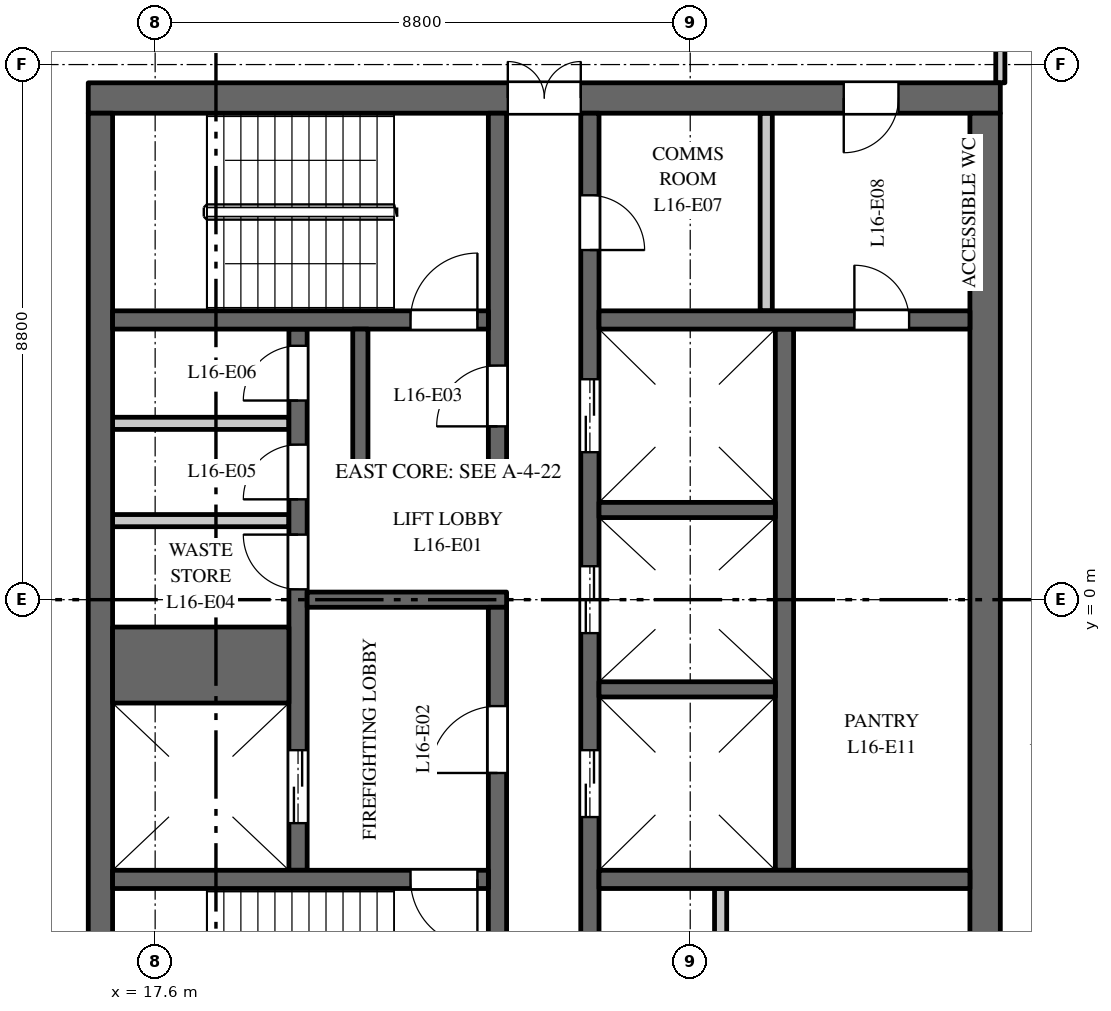
"""IFC4 building model, lengths in metres.
Left out: names, types, materials, properties, quantities, classifications, styles, units other than length and angle.
Written with IfcOpenShell. Run it as: python <this file> out.ifc"""

import sys

from ifc_helpers import new_model, si_unit, direction, frame, frame_2d, origin, place, context, subcontext, project, spatial, rectangle, extrude, element, fill, save


model = new_model("IFC4")
c1 = context("Model", 3, precision=1e-05, world=origin(), true_north=direction((0.0, 1.0)))
c2 = subcontext(c1, "Body", "Model", "MODEL_VIEW")
j1 = project(units=[si_unit("LENGTHUNIT", "METRE"), si_unit("PLANEANGLEUNIT", "RADIAN")], contexts=[c1])
p1 = place(None, origin())
s1 = spatial("IfcSite", under=j1, at=p1, CompositionType="ELEMENT")
p2 = place(p1, origin())
s2 = spatial("IfcBuilding", under=s1, at=p2, CompositionType="ELEMENT")
p3 = place(p2, frame((0.0, 0.0, 74.5)))
s3 = spatial("IfcBuildingStorey", under=s2, at=p3, CompositionType="ELEMENT", Elevation=74.5)
p4 = place(p3, frame((16.5, 8.25, 0.0), z_axis=(0.0, 0.0, 1.0), x_axis=(1.0, 0.0, 0.0)))
e1 = element("IfcWall", 1, at=p4, inside=s3, PredefinedType="SHEAR", context=c2, shape_type="SweptSolid", body=[
    extrude(rectangle(XDim=15.0, YDim=0.5, at=frame_2d((7.5, 0.0))), origin(), (0.0, 0.0, 1.0), 3.7),
])
p5 = place(p4, frame((6.9, 0.0, 0.0)))
e2 = element("IfcOpeningElement", 2, at=p5, cuts=e1, PredefinedType="OPENING", context=c2, shape_type="SweptSolid", body=[
    extrude(rectangle(XDim=1.2, YDim=2.1, at=frame_2d((0.6, 1.05))), frame((0.0, 0.26, 0.0), z_axis=(0.0, -1.0, 0.0), x_axis=(1.0, 0.0, 0.0)), (0.0, 0.0, 1.0), 0.52),
])
p6 = place(p4, frame((12.425, 0.0, 0.0)))
e3 = element("IfcOpeningElement", 3, at=p6, cuts=e1, PredefinedType="OPENING", context=c2, shape_type="SweptSolid", body=[
    extrude(rectangle(XDim=0.9, YDim=2.1, at=frame_2d((0.45, 1.05))), frame((0.0, 0.26, 0.0), z_axis=(0.0, -1.0, 0.0), x_axis=(1.0, 0.0, 0.0)), (0.0, 0.0, 1.0), 0.52),
])
for number, where, z_axis, x_axis in (
    (4, (16.9, 1.3, 0.0), (0.0, 0.0, 1.0), (1.0, 0.0, 0.0)),
    (5, (16.9, 2.9, 0.0), (0.0, 0.0, 1.0), (1.0, 0.0, 0.0)),
):
    element("IfcWall", number, at=place(p3, frame(where, z_axis=z_axis, x_axis=x_axis)), inside=s3, PredefinedType="PARTITIONING", context=c2, shape_type="SweptSolid", body=[
        extrude(rectangle(XDim=2.9, YDim=0.2, at=frame_2d((1.45, 0.0))), origin(), (0.0, 0.0, 1.0), 3.7),
    ])
p7 = place(p3, frame((27.95, -4.45, 0.0), z_axis=(0.0, 0.0, 1.0), x_axis=(0.0, 1.0, 0.0)))
e6 = element("IfcWall", 6, at=p7, inside=s3, PredefinedType="SHEAR", context=c2, shape_type="SweptSolid", body=[
    extrude(rectangle(XDim=8.9, YDim=0.3, at=frame_2d((4.45, 0.0))), origin(), (0.0, 0.0, 1.0), 3.7),
])
p8 = place(p3, frame((19.95, -4.45, 0.0), z_axis=(0.0, 0.0, 1.0), x_axis=(0.0, 1.0, 0.0)))
e7 = element("IfcWall", 7, at=p8, inside=s3, PredefinedType="SHEAR", context=c2, shape_type="SweptSolid", body=[
    extrude(rectangle(XDim=8.9, YDim=0.3, at=frame_2d((4.45, 0.0))), origin(), (0.0, 0.0, 1.0), 3.7),
])
p9 = place(p8, frame((0.775, 0.0, 0.0)))
e8 = element("IfcOpeningElement", 8, at=p9, cuts=e7, PredefinedType="OPENING", context=c2, shape_type="SweptSolid", body=[
    extrude(rectangle(XDim=1.2, YDim=2.1, at=frame_2d((0.6, 1.05))), frame((0.0, 0.16, 0.0), z_axis=(0.0, -1.0, 0.0), x_axis=(1.0, 0.0, 0.0)), (0.0, 0.0, 1.0), 0.32),
])
p10 = place(p8, frame((4.62, 0.0, 0.0)))
e9 = element("IfcOpeningElement", 9, at=p10, cuts=e7, PredefinedType="OPENING", context=c2, shape_type="SweptSolid", body=[
    extrude(rectangle(XDim=0.9, YDim=2.1, at=frame_2d((0.45, 1.05))), frame((0.0, 0.16, 0.0), z_axis=(0.0, -1.0, 0.0), x_axis=(1.0, 0.0, 0.0)), (0.0, 0.0, 1.0), 0.32),
])
p11 = place(p8, frame((6.1, 0.0, 0.0)))
e10 = element("IfcOpeningElement", 10, at=p11, cuts=e7, PredefinedType="OPENING", context=c2, shape_type="SweptSolid", body=[
    extrude(rectangle(XDim=0.9, YDim=2.1, at=frame_2d((0.45, 1.05))), frame((0.0, 0.16, 0.0), z_axis=(0.0, -1.0, 0.0), x_axis=(1.0, 0.0, 0.0)), (0.0, 0.0, 1.0), 0.32),
])
p12 = place(p8, frame((7.725, 0.0, 0.0)))
e11 = element("IfcOpeningElement", 11, at=p12, cuts=e7, PredefinedType="OPENING", context=c2, shape_type="SweptSolid", body=[
    extrude(rectangle(XDim=0.9, YDim=2.1, at=frame_2d((0.45, 1.05))), frame((0.0, 0.16, 0.0), z_axis=(0.0, -1.0, 0.0), x_axis=(1.0, 0.0, 0.0)), (0.0, 0.0, 1.0), 0.32),
])
p13 = place(p3, frame((24.75, -8.0, 0.0), z_axis=(0.0, 0.0, 1.0), x_axis=(0.0, 1.0, 0.0)))
e12 = element("IfcWall", 12, at=p13, inside=s3, PredefinedType="SHEAR", context=c2, shape_type="SweptSolid", body=[
    extrude(rectangle(XDim=16.0, YDim=0.3, at=frame_2d((8.0, 0.0))), origin(), (0.0, 0.0, 1.0), 3.7),
])
p14 = place(p13, frame((4.425, 0.0, 0.0)))
e13 = element("IfcOpeningElement", 13, at=p14, cuts=e12, PredefinedType="OPENING", context=c2, shape_type="SweptSolid", body=[
    extrude(rectangle(XDim=1.1, YDim=2.1, at=frame_2d((0.55, 1.05))), frame((0.0, 0.16, 0.0), z_axis=(0.0, -1.0, 0.0), x_axis=(1.0, 0.0, 0.0)), (0.0, 0.0, 1.0), 0.32),
])
p15 = place(p13, frame((7.45, 0.0, 0.0)))
e14 = element("IfcOpeningElement", 14, at=p15, cuts=e12, PredefinedType="OPENING", context=c2, shape_type="SweptSolid", body=[
    extrude(rectangle(XDim=1.1, YDim=2.1, at=frame_2d((0.55, 1.05))), frame((0.0, 0.16, 0.0), z_axis=(0.0, -1.0, 0.0), x_axis=(1.0, 0.0, 0.0)), (0.0, 0.0, 1.0), 0.32),
])
p16 = place(p13, frame((10.425, 0.0, 0.0)))
e15 = element("IfcOpeningElement", 15, at=p16, cuts=e12, PredefinedType="OPENING", context=c2, shape_type="SweptSolid", body=[
    extrude(rectangle(XDim=1.2, YDim=2.1, at=frame_2d((0.6, 1.05))), frame((0.0, 0.16, 0.0), z_axis=(0.0, -1.0, 0.0), x_axis=(1.0, 0.0, 0.0)), (0.0, 0.0, 1.0), 0.32),
])
p17 = place(p13, frame((13.75, 0.0, 0.0)))
e16 = element("IfcOpeningElement", 16, at=p17, cuts=e12, PredefinedType="OPENING", context=c2, shape_type="SweptSolid", body=[
    extrude(rectangle(XDim=0.9, YDim=2.1, at=frame_2d((0.45, 1.05))), frame((0.0, 0.16, 0.0), z_axis=(0.0, -1.0, 0.0), x_axis=(1.0, 0.0, 0.0)), (0.0, 0.0, 1.0), 0.32),
])
p18 = place(p13, frame((1.35, 0.0, 0.0)))
e17 = element("IfcOpeningElement", 17, at=p18, cuts=e12, PredefinedType="OPENING", context=c2, shape_type="SweptSolid", body=[
    extrude(rectangle(XDim=0.9, YDim=2.1, at=frame_2d((0.45, 1.05))), frame((0.0, 0.16, 0.0), z_axis=(0.0, -1.0, 0.0), x_axis=(1.0, 0.0, 0.0)), (0.0, 0.0, 1.0), 0.32),
])
p19 = place(p3, frame((20.1, 0.0, 0.0), z_axis=(0.0, 0.0, 1.0), x_axis=(1.0, 0.0, 0.0)))
e18 = element("IfcWall", 18, at=p19, inside=s3, PredefinedType="SHEAR", context=c2, shape_type="SweptSolid", body=[
    extrude(rectangle(XDim=3.28, YDim=0.25, at=frame_2d((1.64, 0.0))), origin(), (0.0, 0.0, 1.0), 3.7),
])
p20 = place(p3, frame((16.7, -8.0, 0.0), z_axis=(0.0, 0.0, 1.0), x_axis=(0.0, 1.0, 0.0)))
e19 = element("IfcWall", 19, at=p20, inside=s3, PredefinedType="SHEAR", context=c2, shape_type="SweptSolid", body=[
    extrude(rectangle(XDim=16.0, YDim=0.4, at=frame_2d((8.0, 0.0))), origin(), (0.0, 0.0, 1.0), 3.7),
])
p21 = place(p3, frame((31.25, -8.0, 0.0), z_axis=(0.0, 0.0, 1.0), x_axis=(0.0, 1.0, 0.0)))
e20 = element("IfcWall", 20, at=p21, inside=s3, PredefinedType="SHEAR", context=c2, shape_type="SweptSolid", body=[
    extrude(rectangle(XDim=16.0, YDim=0.5, at=frame_2d((8.0, 0.0))), origin(), (0.0, 0.0, 1.0), 3.7),
])
p22 = place(p3, frame((24.9, 4.6, 0.0), z_axis=(0.0, 0.0, 1.0), x_axis=(1.0, 0.0, 0.0)))
e21 = element("IfcWall", 21, at=p22, inside=s3, PredefinedType="SHEAR", context=c2, shape_type="SweptSolid", body=[
    extrude(rectangle(XDim=6.1, YDim=0.3, at=frame_2d((3.05, 0.0))), origin(), (0.0, 0.0, 1.0), 3.7),
])
p23 = place(p22, frame((4.2, 0.0, 0.0)))
e22 = element("IfcOpeningElement", 22, at=p23, cuts=e21, PredefinedType="OPENING", context=c2, shape_type="SweptSolid", body=[
    extrude(rectangle(XDim=0.9, YDim=2.1, at=frame_2d((0.45, 1.05))), frame((0.0, 0.16, 0.0), z_axis=(0.0, -1.0, 0.0), x_axis=(1.0, 0.0, 0.0)), (0.0, 0.0, 1.0), 0.32),
])
for number, where, z_axis, x_axis in (
    (23, (27.65, 4.75, 0.0), (0.0, 0.0, 1.0), (0.0, 1.0, 0.0)),
    (24, (26.9, -8.0, 0.0), (0.0, 0.0, 1.0), (0.0, 1.0, 0.0)),
):
    element("IfcWall", number, at=place(p3, frame(where, z_axis=z_axis, x_axis=x_axis)), inside=s3, PredefinedType="PARTITIONING", context=c2, shape_type="SweptSolid", body=[
        extrude(rectangle(XDim=3.25, YDim=0.2, at=frame_2d((1.625, 0.0))), origin(), (0.0, 0.0, 1.0), 3.7),
    ])
p24 = place(p3, frame((24.9, -4.6, 0.0), z_axis=(0.0, 0.0, 1.0), x_axis=(1.0, 0.0, 0.0)))
e25 = element("IfcWall", 25, at=p24, inside=s3, PredefinedType="SHEAR", context=c2, shape_type="SweptSolid", body=[
    extrude(rectangle(XDim=6.1, YDim=0.3, at=frame_2d((3.05, 0.0))), origin(), (0.0, 0.0, 1.0), 3.7),
])
p25 = place(p3, frame((16.9, -1.075, 0.0), z_axis=(0.0, 0.0, 1.0), x_axis=(1.0, 0.0, 0.0)))
e26 = element("IfcWall", 26, at=p25, inside=s3, PredefinedType="SHEAR", context=c2, shape_type="SweptSolid", body=[
    extrude(rectangle(XDim=2.9, YDim=1.25, at=frame_2d((1.45, 0.0))), origin(), (0.0, 0.0, 1.0), 3.7),
])
for number, where, z_axis, x_axis in (
    (27, (24.9, -1.475, 0.0), (0.0, 0.0, 1.0), (1.0, 0.0, 0.0)),
    (28, (24.9, 1.475, 0.0), (0.0, 0.0, 1.0), (1.0, 0.0, 0.0)),
):
    element("IfcWall", number, at=place(p3, frame(where, z_axis=z_axis, x_axis=x_axis)), inside=s3, PredefinedType="SHEAR", context=c2, shape_type="SweptSolid", body=[
        extrude(rectangle(XDim=2.9, YDim=0.25, at=frame_2d((1.45, 0.0))), origin(), (0.0, 0.0, 1.0), 3.7),
    ])
p26 = place(p3, frame((23.23, 2.25, 0.0), z_axis=(0.0, 0.0, 1.0), x_axis=(0.0, 1.0, 0.0)))
e29 = element("IfcWall", 29, at=p26, inside=s3, PredefinedType="SHEAR", context=c2, shape_type="SweptSolid", body=[
    extrude(rectangle(XDim=5.75, YDim=0.3, at=frame_2d((2.875, 0.0))), origin(), (0.0, 0.0, 1.0), 3.7),
])
p27 = place(p26, frame((0.6, 0.0, 0.0)))
e30 = element("IfcOpeningElement", 30, at=p27, cuts=e29, PredefinedType="OPENING", context=c2, shape_type="SweptSolid", body=[
    extrude(rectangle(XDim=1.0, YDim=2.1, at=frame_2d((0.5, 1.05))), frame((0.0, 0.16, 0.0), z_axis=(0.0, -1.0, 0.0), x_axis=(1.0, 0.0, 0.0)), (0.0, 0.0, 1.0), 0.32),
])
p28 = place(p3, frame((23.23, -8.0, 0.0), z_axis=(0.0, 0.0, 1.0), x_axis=(0.0, 1.0, 0.0)))
e31 = element("IfcWall", 31, at=p28, inside=s3, PredefinedType="SHEAR", context=c2, shape_type="SweptSolid", body=[
    extrude(rectangle(XDim=7.875, YDim=0.3, at=frame_2d((3.938, 0.0))), origin(), (0.0, 0.0, 1.0), 3.7),
])
p29 = place(p28, frame((5.15, 0.0, 0.0)))
e32 = element("IfcOpeningElement", 32, at=p29, cuts=e31, PredefinedType="OPENING", context=c2, shape_type="SweptSolid", body=[
    extrude(rectangle(XDim=1.1, YDim=2.1, at=frame_2d((0.55, 1.05))), frame((0.0, 0.16, 0.0), z_axis=(0.0, -1.0, 0.0), x_axis=(1.0, 0.0, 0.0)), (0.0, 0.0, 1.0), 0.32),
])
p30 = place(p3, frame((16.9, 4.6, 0.0), z_axis=(0.0, 0.0, 1.0), x_axis=(1.0, 0.0, 0.0)))
e33 = element("IfcWall", 33, at=p30, inside=s3, PredefinedType="SHEAR", context=c2, shape_type="SweptSolid", body=[
    extrude(rectangle(XDim=6.18, YDim=0.3, at=frame_2d((3.09, 0.0))), origin(), (0.0, 0.0, 1.0), 3.7),
])
p31 = place(p30, frame((4.9, 0.0, 0.0)))
e34 = element("IfcOpeningElement", 34, at=p31, cuts=e33, PredefinedType="OPENING", context=c2, shape_type="SweptSolid", body=[
    extrude(rectangle(XDim=1.1, YDim=2.1, at=frame_2d((0.55, 1.05))), frame((0.0, 0.16, 0.0), z_axis=(0.0, -1.0, 0.0), x_axis=(1.0, 0.0, 0.0)), (0.0, 0.0, 1.0), 0.32),
])
p32 = place(p3, frame((16.9, -4.6, 0.0), z_axis=(0.0, 0.0, 1.0), x_axis=(1.0, 0.0, 0.0)))
e35 = element("IfcWall", 35, at=p32, inside=s3, PredefinedType="SHEAR", context=c2, shape_type="SweptSolid", body=[
    extrude(rectangle(XDim=6.18, YDim=0.3, at=frame_2d((3.09, 0.0))), origin(), (0.0, 0.0, 1.0), 3.7),
])
p33 = place(p32, frame((4.9, 0.0, 0.0)))
e36 = element("IfcOpeningElement", 36, at=p33, cuts=e35, PredefinedType="OPENING", context=c2, shape_type="SweptSolid", body=[
    extrude(rectangle(XDim=1.1, YDim=2.1, at=frame_2d((0.55, 1.05))), frame((0.0, 0.16, 0.0), z_axis=(0.0, -1.0, 0.0), x_axis=(1.0, 0.0, 0.0)), (0.0, 0.0, 1.0), 0.32),
])
p34 = place(p3, frame((20.85, 2.125, 0.0), z_axis=(0.0, 0.0, 1.0), x_axis=(1.0, 0.0, 0.0)))
e37 = element("IfcWall", 37, at=p34, inside=s3, PredefinedType="SHEAR", context=c2, shape_type="SweptSolid", body=[
    extrude(rectangle(XDim=2.53, YDim=0.25, at=frame_2d((1.265, 0.0))), origin(), (0.0, 0.0, 1.0), 3.7),
])
p35 = place(p3, frame((20.975, 2.25, 0.0), z_axis=(0.0, 0.0, 1.0), x_axis=(0.0, 1.0, 0.0)))
e38 = element("IfcWall", 38, at=p35, inside=s3, PredefinedType="SHEAR", context=c2, shape_type="SweptSolid", body=[
    extrude(rectangle(XDim=2.2, YDim=0.25, at=frame_2d((1.1, 0.0))), origin(), (0.0, 0.0, 1.0), 3.7),
])
p36 = place(p3, frame((31.5, 8.5, 0.0), z_axis=(0.0, 0.0, 1.0), x_axis=(0.0, 1.0, 0.0)))
e39 = element("IfcWall", 39, at=p36, inside=s3, PredefinedType="PARTITIONING", context=c2, shape_type="SweptSolid", body=[
    extrude(rectangle(XDim=2.2, YDim=0.15, at=frame_2d((1.1, 0.0))), origin(), (0.0, 0.0, 1.0), 2.85),
])
p37 = place(p9, origin())
e40 = element("IfcDoor", 40, at=p37, inside=s3, OperationType="DOUBLE_DOOR_SLIDING", PredefinedType="DOOR", context=c2, shape_type="SweptSolid", body=[
    extrude(rectangle(XDim=1.2, YDim=2.1, at=frame_2d((0.6, 1.05))), frame((0.0, 0.025, 0.0), z_axis=(0.0, -1.0, 0.0), x_axis=(1.0, 0.0, 0.0)), (0.0, 0.0, 1.0), 0.05),
])
fill(e8, e40)
p38 = place(p14, origin())
e41 = element("IfcDoor", 41, at=p38, inside=s3, OperationType="DOUBLE_DOOR_SLIDING", PredefinedType="DOOR", context=c2, shape_type="SweptSolid", body=[
    extrude(rectangle(XDim=1.1, YDim=2.1, at=frame_2d((0.55, 1.05))), frame((0.0, 0.025, 0.0), z_axis=(0.0, -1.0, 0.0), x_axis=(1.0, 0.0, 0.0)), (0.0, 0.0, 1.0), 0.05),
])
fill(e13, e41)
p39 = place(p15, origin())
e42 = element("IfcDoor", 42, at=p39, inside=s3, OperationType="DOUBLE_DOOR_SLIDING", PredefinedType="DOOR", context=c2, shape_type="SweptSolid", body=[
    extrude(rectangle(XDim=1.1, YDim=2.1, at=frame_2d((0.55, 1.05))), frame((0.0, 0.025, 0.0), z_axis=(0.0, -1.0, 0.0), x_axis=(1.0, 0.0, 0.0)), (0.0, 0.0, 1.0), 0.05),
])
fill(e14, e42)
p40 = place(p16, origin())
e43 = element("IfcDoor", 43, at=p40, inside=s3, OperationType="DOUBLE_DOOR_SLIDING", PredefinedType="DOOR", context=c2, shape_type="SweptSolid", body=[
    extrude(rectangle(XDim=1.2, YDim=2.1, at=frame_2d((0.6, 1.05))), frame((0.0, 0.025, 0.0), z_axis=(0.0, -1.0, 0.0), x_axis=(1.0, 0.0, 0.0)), (0.0, 0.0, 1.0), 0.05),
])
fill(e15, e43)
p41 = place(p31, origin())
e44 = element("IfcDoor", 44, at=p41, inside=s3, OperationType="SINGLE_SWING_LEFT", PredefinedType="DOOR", context=c2, shape_type="SweptSolid", body=[
    extrude(rectangle(XDim=1.1, YDim=2.1, at=frame_2d((0.55, 1.05))), frame((0.0, 0.025, 0.0), z_axis=(0.0, -1.0, 0.0), x_axis=(1.0, 0.0, 0.0)), (0.0, 0.0, 1.0), 0.05),
])
fill(e34, e44)
p42 = place(p33, origin())
e45 = element("IfcDoor", 45, at=p42, inside=s3, OperationType="SINGLE_SWING_RIGHT", PredefinedType="DOOR", context=c2, shape_type="SweptSolid", body=[
    extrude(rectangle(XDim=1.1, YDim=2.1, at=frame_2d((0.55, 1.05))), frame((0.0, 0.025, 0.0), z_axis=(0.0, -1.0, 0.0), x_axis=(1.0, 0.0, 0.0)), (0.0, 0.0, 1.0), 0.05),
])
fill(e36, e45)
p43 = place(p29, origin())
e46 = element("IfcDoor", 46, at=p43, inside=s3, OperationType="SINGLE_SWING_RIGHT", PredefinedType="DOOR", context=c2, shape_type="SweptSolid", body=[
    extrude(rectangle(XDim=1.1, YDim=2.1, at=frame_2d((0.55, 1.05))), frame((0.0, 0.025, 0.0), z_axis=(0.0, -1.0, 0.0), x_axis=(1.0, 0.0, 0.0)), (0.0, 0.0, 1.0), 0.05),
])
fill(e32, e46)
p44 = place(p27, origin())
e47 = element("IfcDoor", 47, at=p44, inside=s3, OperationType="SINGLE_SWING_RIGHT", PredefinedType="DOOR", context=c2, shape_type="SweptSolid", body=[
    extrude(rectangle(XDim=1.0, YDim=2.1, at=frame_2d((0.5, 1.05))), frame((0.0, 0.025, 0.0), z_axis=(0.0, -1.0, 0.0), x_axis=(1.0, 0.0, 0.0)), (0.0, 0.0, 1.0), 0.05),
])
fill(e30, e47)
p45 = place(p5, origin())
e48 = element("IfcDoor", 48, at=p45, inside=s3, OperationType="DOUBLE_DOOR_DOUBLE_SWING", PredefinedType="DOOR", context=c2, shape_type="SweptSolid", body=[
    extrude(rectangle(XDim=1.2, YDim=2.1, at=frame_2d((0.6, 1.05))), frame((0.0, 0.025, 0.0), z_axis=(0.0, -1.0, 0.0), x_axis=(1.0, 0.0, 0.0)), (0.0, 0.0, 1.0), 0.05),
])
fill(e2, e48)
p46 = place(p10, origin())
e49 = element("IfcDoor", 49, at=p46, inside=s3, OperationType="SINGLE_SWING_LEFT", PredefinedType="DOOR", context=c2, shape_type="SweptSolid", body=[
    extrude(rectangle(XDim=0.9, YDim=2.1, at=frame_2d((0.45, 1.05))), frame((0.0, 0.025, 0.0), z_axis=(0.0, -1.0, 0.0), x_axis=(1.0, 0.0, 0.0)), (0.0, 0.0, 1.0), 0.05),
])
fill(e9, e49)
p47 = place(p11, origin())
e50 = element("IfcDoor", 50, at=p47, inside=s3, OperationType="SINGLE_SWING_RIGHT", PredefinedType="DOOR", context=c2, shape_type="SweptSolid", body=[
    extrude(rectangle(XDim=0.9, YDim=2.1, at=frame_2d((0.45, 1.05))), frame((0.0, 0.025, 0.0), z_axis=(0.0, -1.0, 0.0), x_axis=(1.0, 0.0, 0.0)), (0.0, 0.0, 1.0), 0.05),
])
fill(e10, e50)
p48 = place(p12, origin())
e51 = element("IfcDoor", 51, at=p48, inside=s3, OperationType="SINGLE_SWING_RIGHT", PredefinedType="DOOR", context=c2, shape_type="SweptSolid", body=[
    extrude(rectangle(XDim=0.9, YDim=2.1, at=frame_2d((0.45, 1.05))), frame((0.0, 0.025, 0.0), z_axis=(0.0, -1.0, 0.0), x_axis=(1.0, 0.0, 0.0)), (0.0, 0.0, 1.0), 0.05),
])
fill(e11, e51)
p49 = place(p17, origin())
e52 = element("IfcDoor", 52, at=p49, inside=s3, OperationType="SINGLE_SWING_LEFT", PredefinedType="DOOR", context=c2, shape_type="SweptSolid", body=[
    extrude(rectangle(XDim=0.9, YDim=2.1, at=frame_2d((0.45, 1.05))), frame((0.0, 0.025, 0.0), z_axis=(0.0, -1.0, 0.0), x_axis=(1.0, 0.0, 0.0)), (0.0, 0.0, 1.0), 0.05),
])
fill(e16, e52)
p50 = place(p6, origin())
e53 = element("IfcDoor", 53, at=p50, inside=s3, OperationType="SINGLE_SWING_LEFT", PredefinedType="DOOR", context=c2, shape_type="SweptSolid", body=[
    extrude(rectangle(XDim=0.9, YDim=2.1, at=frame_2d((0.45, 1.05))), frame((0.0, 0.025, 0.0), z_axis=(0.0, -1.0, 0.0), x_axis=(1.0, 0.0, 0.0)), (0.0, 0.0, 1.0), 0.05),
])
fill(e3, e53)
p51 = place(p23, origin())
e54 = element("IfcDoor", 54, at=p51, inside=s3, OperationType="SINGLE_SWING_RIGHT", PredefinedType="DOOR", context=c2, shape_type="SweptSolid", body=[
    extrude(rectangle(XDim=0.9, YDim=2.1, at=frame_2d((0.45, 1.05))), frame((0.0, 0.025, 0.0), z_axis=(0.0, -1.0, 0.0), x_axis=(1.0, 0.0, 0.0)), (0.0, 0.0, 1.0), 0.05),
])
fill(e22, e54)
save(model, sys.argv[1])
